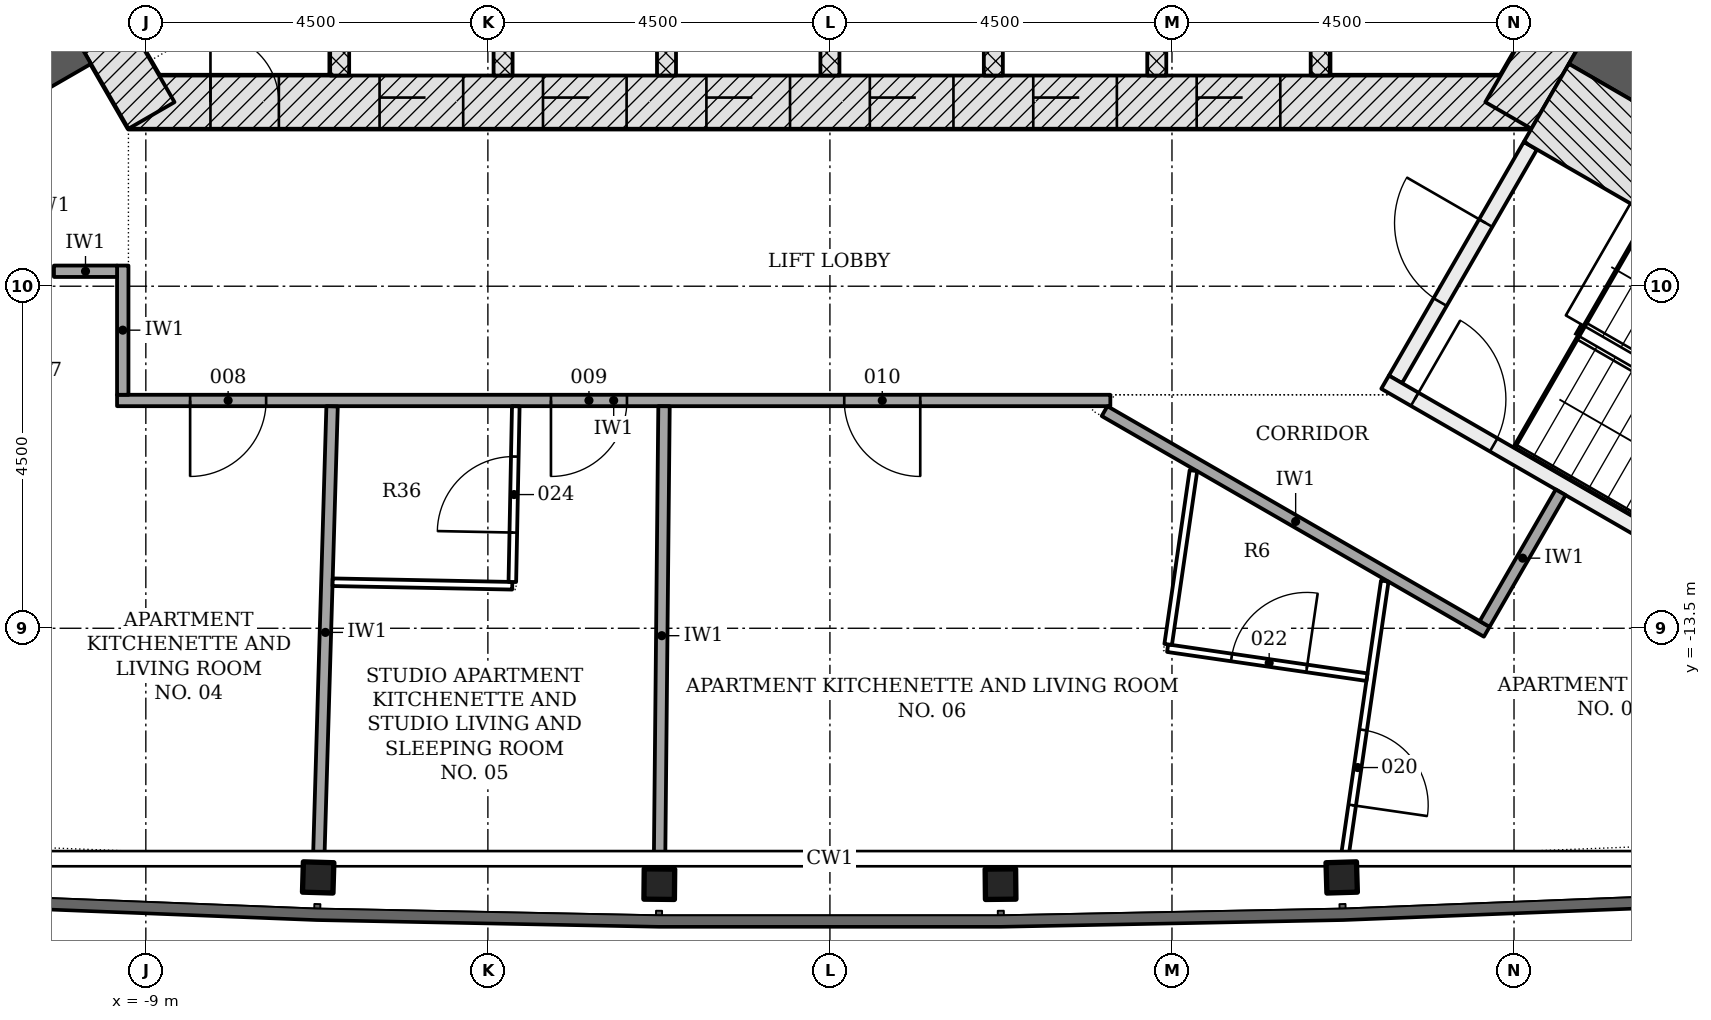
"""IFC4 building model, lengths in metres.
Left out: names, types, materials, properties, quantities, classifications, styles, units other than length and angle.
Written with IfcOpenShell. Run it as: python <this file> out.ifc"""

import sys

from ifc_helpers import new_model, si_unit, direction, frame, frame_2d, origin, origin_2d, place, context, subcontext, project, spatial, rectangle, i_section, extrude, element, fill, save


model = new_model("IFC4")
c1 = context("Model", 3, precision=1e-05, world=origin(), true_north=direction((0.0, 1.0)))
c2 = subcontext(c1, "Body", "Model", "MODEL_VIEW")
j1 = project(units=[si_unit("LENGTHUNIT", "METRE"), si_unit("PLANEANGLEUNIT", "RADIAN")], contexts=[c1])
p1 = place(None, origin())
s1 = spatial("IfcSite", under=j1, at=p1, CompositionType="ELEMENT")
p2 = place(p1, origin())
s2 = spatial("IfcBuilding", under=s1, at=p2, CompositionType="ELEMENT")
p3 = place(p2, frame((0.0, 0.0, 91.5)))
s3 = spatial("IfcBuildingStorey", under=s2, at=p3, CompositionType="ELEMENT", Elevation=91.5)
p4 = place(p3, frame((-9.229, -6.578, -0.2), z_axis=(0.0, 0.0, 1.0), x_axis=(1.0, 0.0, 0.0)))
e1 = element("IfcWall", 1, at=p4, inside=s3, PredefinedType="SHEAR", context=c2, shape_type="SweptSolid", body=[
    extrude(rectangle(XDim=18.458, YDim=0.7, at=frame_2d((9.229, 0.0))), origin(), (0.0, 0.0, 1.0), 3.6),
])
p5 = place(p4, frame((3.304, 0.0, 0.2)))
e2 = element("IfcOpeningElement", 2, at=p5, cuts=e1, PredefinedType="OPENING", context=c2, shape_type="SweptSolid", body=[
    extrude(rectangle(XDim=1.1, YDim=2.1, at=frame_2d((0.55, 1.05))), frame((0.0, 0.36, 0.0), z_axis=(0.0, -1.0, 0.0), x_axis=(1.0, 0.0, 0.0)), (0.0, 0.0, 1.0), 0.72),
])
p6 = place(p4, frame((5.454, 0.0, 0.2)))
e3 = element("IfcOpeningElement", 3, at=p6, cuts=e1, PredefinedType="OPENING", context=c2, shape_type="SweptSolid", body=[
    extrude(rectangle(XDim=1.1, YDim=2.1, at=frame_2d((0.55, 1.05))), frame((0.0, 0.36, 0.0), z_axis=(0.0, -1.0, 0.0), x_axis=(1.0, 0.0, 0.0)), (0.0, 0.0, 1.0), 0.72),
])
p7 = place(p4, frame((7.604, 0.0, 0.2)))
e4 = element("IfcOpeningElement", 4, at=p7, cuts=e1, PredefinedType="OPENING", context=c2, shape_type="SweptSolid", body=[
    extrude(rectangle(XDim=1.1, YDim=2.1, at=frame_2d((0.55, 1.05))), frame((0.0, 0.36, 0.0), z_axis=(0.0, -1.0, 0.0), x_axis=(1.0, 0.0, 0.0)), (0.0, 0.0, 1.0), 0.72),
])
p8 = place(p4, frame((9.754, 0.0, 0.2)))
e5 = element("IfcOpeningElement", 5, at=p8, cuts=e1, PredefinedType="OPENING", context=c2, shape_type="SweptSolid", body=[
    extrude(rectangle(XDim=1.1, YDim=2.1, at=frame_2d((0.55, 1.05))), frame((0.0, 0.36, 0.0), z_axis=(0.0, -1.0, 0.0), x_axis=(1.0, 0.0, 0.0)), (0.0, 0.0, 1.0), 0.72),
])
p9 = place(p4, frame((11.904, 0.0, 0.2)))
e6 = element("IfcOpeningElement", 6, at=p9, cuts=e1, PredefinedType="OPENING", context=c2, shape_type="SweptSolid", body=[
    extrude(rectangle(XDim=1.1, YDim=2.1, at=frame_2d((0.55, 1.05))), frame((0.0, 0.36, 0.0), z_axis=(0.0, -1.0, 0.0), x_axis=(1.0, 0.0, 0.0)), (0.0, 0.0, 1.0), 0.72),
])
p10 = place(p4, frame((14.054, 0.0, 0.2)))
e7 = element("IfcOpeningElement", 7, at=p10, cuts=e1, PredefinedType="OPENING", context=c2, shape_type="SweptSolid", body=[
    extrude(rectangle(XDim=1.1, YDim=2.1, at=frame_2d((0.55, 1.05))), frame((0.0, 0.36, 0.0), z_axis=(0.0, -1.0, 0.0), x_axis=(1.0, 0.0, 0.0)), (0.0, 0.0, 1.0), 0.72),
])
p11 = place(p4, frame((1.079, 0.0, 0.2)))
e8 = element("IfcOpeningElement", 8, at=p11, cuts=e1, PredefinedType="OPENING", context=c2, shape_type="SweptSolid", body=[
    extrude(rectangle(XDim=0.9, YDim=2.1, at=frame_2d((0.45, 1.05))), frame((0.0, 0.36, 0.0), z_axis=(0.0, -1.0, 0.0), x_axis=(1.0, 0.0, 0.0)), (0.0, 0.0, 1.0), 0.72),
])
for number, where, z_axis, x_axis in (
    (9, (8.926, -6.753, -0.2), (0.0, 0.0, 1.0), (0.5, 0.866, 0.0)),
    (10, (-10.311, -4.353, -0.2), (0.0, 0.0, 1.0), (0.5, -0.866, 0.0)),
):
    element("IfcWall", number, at=place(p3, frame(where, z_axis=z_axis, x_axis=x_axis)), inside=s3, PredefinedType="SHEAR", context=c2, shape_type="SweptSolid", body=[
        extrude(rectangle(XDim=2.771, YDim=0.7, at=frame_2d((1.386, 0.0))), origin(), (0.0, 0.0, 1.0), 3.6),
    ])
for number, where, z_axis, x_axis in (
    (11, (-9.922, -5.728, -0.2), (0.0, 0.0, 1.0), (-0.866, -0.5, 0.0)),
    (12, (9.922, -5.728, -0.2), (0.0, 0.0, 1.0), (0.866, -0.5, 0.0)),
):
    element("IfcWall", number, at=place(p3, frame(where, z_axis=z_axis, x_axis=x_axis)), inside=s3, PredefinedType="SHEAR", context=c2, shape_type="SweptSolid", body=[
        extrude(rectangle(XDim=12.677, YDim=0.8, at=frame_2d((6.339, 0.0))), origin(), (0.0, 0.0, 1.0), 3.6),
    ])
for number, where, z_axis, x_axis in (
    (13, (-6.733, -16.778, -0.2), (0.0, 0.0, 1.0), (1.0, -0.03, 0.0)),
    (14, (-2.245, -16.866, -0.2), (0.0, 0.0, 1.0), (1.0, -0.01, 0.0)),
    (15, (2.245, -16.866, -0.2), (0.0, 0.0, 1.0), (1.0, 0.01, 0.0)),
    (16, (6.733, -16.778, -0.2), (0.0, 0.0, 1.0), (1.0, 0.03, 0.0)),
):
    element("IfcColumn", number, at=place(p3, frame(where, z_axis=z_axis, x_axis=x_axis)), inside=s3, PredefinedType="COLUMN", context=c2, shape_type="SweptSolid", body=[
        extrude(i_section(OverallWidth=0.401, OverallDepth=0.399, WebThickness=0.025, FlangeThickness=0.04, FilletRadius=0.015, at=origin_2d()), origin(), (0.0, 0.0, 1.0), 3.6),
    ])
for number, where, z_axis, x_axis in (
    (17, (-6.45, -6.228, -0.2), (0.0, 0.0, 1.0), (0.0, 1.0, 0.0)),
    (18, (-4.3, -6.228, -0.2), (0.0, 0.0, 1.0), (0.0, 1.0, 0.0)),
    (19, (-2.15, -6.228, -0.2), (0.0, 0.0, 1.0), (0.0, 1.0, 0.0)),
    (20, (0.0, -6.228, -0.2), (0.0, 0.0, 1.0), (0.0, 1.0, 0.0)),
    (21, (2.15, -6.228, -0.2), (0.0, 0.0, 1.0), (0.0, 1.0, 0.0)),
    (22, (4.3, -6.228, -0.2), (0.0, 0.0, 1.0), (0.0, 1.0, 0.0)),
    (23, (6.45, -6.228, -0.2), (0.0, 0.0, 1.0), (0.0, 1.0, 0.0)),
):
    element("IfcWall", number, at=place(p3, frame(where, z_axis=z_axis, x_axis=x_axis)), inside=s3, PredefinedType="PARTITIONING", context=c2, shape_type="SweptSolid", body=[
        extrude(rectangle(XDim=2.5, YDim=0.25, at=frame_2d((1.25, 0.0))), origin(), (0.0, 0.0, 1.0), 3.6),
    ])
p12 = place(p3, frame((-10.418, -4.868, -0.2), z_axis=(0.0, 0.0, 1.0), x_axis=(-0.866018442252, -0.500012057535, 0.0)))
e24 = element("IfcWall", 24, at=p12, inside=s3, PredefinedType="SHEAR", context=c2, shape_type="SweptSolid", body=[
    extrude(rectangle(XDim=7.2, YDim=1.186, at=frame_2d((3.6, 0.0))), origin(), (0.0, 0.0, 1.0), 3.6),
])
p13 = place(p3, frame((7.44, -10.226, -0.2), z_axis=(0.0, 0.0, 1.0), x_axis=(0.500022077904, 0.866012656725, 0.0)))
e25 = element("IfcWall", 25, at=p13, inside=s3, PredefinedType="SHEAR", context=c2, shape_type="SweptSolid", body=[
    extrude(rectangle(XDim=3.55, YDim=0.2, at=frame_2d((1.775, 0.0))), origin(), (0.0, 0.0, 1.0), 3.6),
])
p14 = place(p13, frame((1.175, 0.0, 0.2)))
e26 = element("IfcOpeningElement", 26, at=p14, cuts=e25, PredefinedType="OPENING", context=c2, shape_type="SweptSolid", body=[
    extrude(rectangle(XDim=1.2, YDim=2.1, at=frame_2d((0.6, 1.05))), frame((0.0, 0.11, 0.0), z_axis=(0.0, -1.0, 0.0), x_axis=(1.0, 0.0, 0.0)), (0.0, 0.0, 1.0), 0.22),
])
p15 = place(p3, frame((7.304, -10.262, -0.2), z_axis=(0.0, 0.0, 1.0), x_axis=(0.866026594901, -0.49999793692, 0.0)))
e27 = element("IfcWall", 27, at=p15, inside=s3, PredefinedType="SHEAR", context=c2, shape_type="SweptSolid", body=[
    extrude(rectangle(XDim=5.6, YDim=0.2, at=frame_2d((2.8, 0.0))), origin(), (0.0, 0.0, 1.0), 3.6),
])
p16 = place(p15, frame((0.45, 0.0, 0.2)))
e28 = element("IfcOpeningElement", 28, at=p16, cuts=e27, PredefinedType="OPENING", context=c2, shape_type="SweptSolid", body=[
    extrude(rectangle(XDim=1.2, YDim=2.1, at=frame_2d((0.6, 1.05))), frame((0.0, 0.11, 0.0), z_axis=(0.0, -1.0, 0.0), x_axis=(1.0, 0.0, 0.0)), (0.0, 0.0, 1.0), 0.22),
])
p17 = place(p3, frame((9.425, -6.588, -0.2), z_axis=(0.0, 0.0, 1.0), x_axis=(0.866018442252, -0.500012057535, 0.0)))
e29 = element("IfcWall", 29, at=p17, inside=s3, PredefinedType="SHEAR", context=c2, shape_type="SweptSolid", body=[
    extrude(rectangle(XDim=7.2, YDim=1.186, at=frame_2d((3.6, 0.0))), origin(), (0.0, 0.0, 1.0), 3.6),
])
p18 = place(p3, frame((3.689, -10.503, 0.0), z_axis=(0.0, 0.0, 1.0), x_axis=(-1.0, 0.0, 0.0)))
e30 = element("IfcWall", 30, at=p18, inside=s3, PredefinedType="PARTITIONING", context=c2, shape_type="SweptSolid", body=[
    extrude(rectangle(XDim=13.068, YDim=0.15, at=frame_2d((6.534, 0.0))), origin(), (0.0, 0.0, 1.0), 2.778),
])
p19 = place(p18, frame((11.106, 0.0, 0.0)))
e31 = element("IfcOpeningElement", 31, at=p19, cuts=e30, PredefinedType="OPENING", context=c2, shape_type="SweptSolid", body=[
    extrude(rectangle(XDim=1.0, YDim=2.1, at=frame_2d((0.5, 1.05))), frame((0.0, 0.085, 0.0), z_axis=(0.0, -1.0, 0.0), x_axis=(1.0, 0.0, 0.0)), (0.0, 0.0, 1.0), 0.17),
])
p20 = place(p18, frame((6.359, 0.0, 0.0)))
e32 = element("IfcOpeningElement", 32, at=p20, cuts=e30, PredefinedType="OPENING", context=c2, shape_type="SweptSolid", body=[
    extrude(rectangle(XDim=1.0, YDim=2.1, at=frame_2d((0.5, 1.05))), frame((0.0, 0.085, 0.0), z_axis=(0.0, -1.0, 0.0), x_axis=(1.0, 0.0, 0.0)), (0.0, 0.0, 1.0), 0.17),
])
p21 = place(p18, frame((2.501, 0.0, 0.0)))
e33 = element("IfcOpeningElement", 33, at=p21, cuts=e30, PredefinedType="OPENING", context=c2, shape_type="SweptSolid", body=[
    extrude(rectangle(XDim=1.0, YDim=2.1, at=frame_2d((0.5, 1.05))), frame((0.0, 0.085, 0.0), z_axis=(0.0, -1.0, 0.0), x_axis=(1.0, 0.0, 0.0)), (0.0, 0.0, 1.0), 0.17),
])
p22 = place(p3, frame((3.613, -10.643, 0.0), z_axis=(0.0, 0.0, 1.0), x_axis=(0.866042728627, -0.499969991291, 0.0)))
e34 = element("IfcWall", 34, at=p22, inside=s3, PredefinedType="PARTITIONING", context=c2, shape_type="SweptSolid", body=[
    extrude(rectangle(XDim=5.805, YDim=0.15, at=frame_2d((2.903, 0.0))), origin(), (0.0, 0.0, 1.0), 2.778),
])
p23 = place(p3, frame((8.614, -13.444, 0.0), z_axis=(0.0, 0.0, 1.0), x_axis=(0.499972520799, 0.866041268327, 0.0)))
e35 = element("IfcWall", 35, at=p23, inside=s3, PredefinedType="PARTITIONING", context=c2, shape_type="SweptSolid", body=[
    extrude(rectangle(XDim=2.0, YDim=0.15, at=frame_2d((1.0, 0.0))), origin(), (0.0, 0.0, 1.0), 3.4),
])
p24 = place(p3, frame((-11.345, -7.012, 0.0), z_axis=(0.0, 0.0, 1.0), x_axis=(0.499998569178, -0.866026229868, 0.0)))
e36 = element("IfcWall", 36, at=p24, inside=s3, PredefinedType="PARTITIONING", context=c2, shape_type="SweptSolid", body=[
    extrude(rectangle(XDim=2.143, YDim=0.15, at=frame_2d((1.072, 0.0))), origin(), (0.0, 0.0, 1.0), 2.778),
])
p25 = place(p3, frame((-9.304, -10.428, 0.0), z_axis=(0.0, 0.0, 1.0), x_axis=(0.0, 1.0, 0.0)))
e37 = element("IfcWall", 37, at=p25, inside=s3, PredefinedType="PARTITIONING", context=c2, shape_type="SweptSolid", body=[
    extrude(rectangle(XDim=1.7, YDim=0.15, at=frame_2d((0.85, 0.0))), origin(), (0.0, 0.0, 1.0), 3.4),
])
p26 = place(p3, frame((-10.209, -8.803, 0.0), z_axis=(0.0, 0.0, 1.0), x_axis=(1.0, 0.0, 0.0)))
e38 = element("IfcWall", 38, at=p26, inside=s3, PredefinedType="PARTITIONING", context=c2, shape_type="SweptSolid", body=[
    extrude(rectangle(XDim=0.83, YDim=0.15, at=frame_2d((0.415, 0.0))), origin(), (0.0, 0.0, 1.0), 3.4),
])
p27 = place(p3, frame((-2.242, -16.616, 0.0), z_axis=(0.0, 0.0, 1.0), x_axis=(0.009866078621, 0.999951329062, 0.0)))
e39 = element("IfcWall", 39, at=p27, inside=s3, PredefinedType="PARTITIONING", context=c2, shape_type="SweptSolid", body=[
    extrude(rectangle(XDim=6.038, YDim=0.15, at=frame_2d((3.019, 0.0))), origin(), (0.0, 0.0, 1.0), 2.778),
])
p28 = place(p3, frame((-6.725, -16.528, 0.0), z_axis=(0.0, 0.0, 1.0), x_axis=(0.029499121441, 0.99956480622, 0.0)))
e40 = element("IfcWall", 40, at=p28, inside=s3, PredefinedType="PARTITIONING", context=c2, shape_type="SweptSolid", body=[
    extrude(rectangle(XDim=5.951, YDim=0.15, at=frame_2d((2.975, 0.0))), origin(), (0.0, 0.0, 1.0), 2.778),
])
p29 = place(p3, frame((7.3, -12.879, 0.0), z_axis=(0.0, 0.0, 1.0), x_axis=(-0.14388794615, -0.989593986922, 0.0)))
e41 = element("IfcWall", 41, at=p29, inside=s3, PredefinedType="PARTITIONING", context=c2, shape_type="SweptSolid", body=[
    extrude(rectangle(XDim=3.685, YDim=0.1, at=frame_2d((1.843, 0.0))), origin(), (0.0, 0.0, 1.0), 2.778),
])
p30 = place(p29, frame((1.979, 0.0, 0.0)))
e42 = element("IfcOpeningElement", 42, at=p30, cuts=e41, PredefinedType="OPENING", context=c2, shape_type="SweptSolid", body=[
    extrude(rectangle(XDim=1.0, YDim=2.1, at=frame_2d((0.5, 1.05))), frame((0.0, 0.06, 0.0), z_axis=(0.0, -1.0, 0.0), x_axis=(1.0, 0.0, 0.0)), (0.0, 0.0, 1.0), 0.12),
])
p31 = place(p3, frame((4.443, -13.762, 0.0), z_axis=(0.0, 0.0, 1.0), x_axis=(0.989603850573, -0.143820092239, 0.0)))
e43 = element("IfcWall", 43, at=p31, inside=s3, PredefinedType="PARTITIONING", context=c2, shape_type="SweptSolid", body=[
    extrude(rectangle(XDim=2.65, YDim=0.1, at=frame_2d((1.325, 0.0))), origin(), (0.0, 0.0, 1.0), 2.778),
])
p32 = place(p31, frame((0.85, 0.0, 0.0)))
e44 = element("IfcOpeningElement", 44, at=p32, cuts=e43, PredefinedType="OPENING", context=c2, shape_type="SweptSolid", body=[
    extrude(rectangle(XDim=1.0, YDim=2.1, at=frame_2d((0.5, 1.05))), frame((0.0, 0.06, 0.0), z_axis=(0.0, -1.0, 0.0), x_axis=(1.0, 0.0, 0.0)), (0.0, 0.0, 1.0), 0.12),
])
p33 = place(p3, frame((4.782, -11.426, 0.0), z_axis=(0.0, 0.0, 1.0), x_axis=(-0.14392103122, -0.989589175756, 0.0)))
e45 = element("IfcWall", 45, at=p33, inside=s3, PredefinedType="PARTITIONING", context=c2, shape_type="SweptSolid", body=[
    extrude(rectangle(XDim=2.311, YDim=0.1, at=frame_2d((1.155, 0.0))), origin(), (0.0, 0.0, 1.0), 3.4),
])
p34 = place(p3, frame((-6.542, -12.894, 0.0), z_axis=(0.0, 0.0, 1.0), x_axis=(0.999805392652, -0.019727565082, 0.0)))
e46 = element("IfcWall", 46, at=p34, inside=s3, PredefinedType="PARTITIONING", context=c2, shape_type="SweptSolid", body=[
    extrude(rectangle(XDim=2.364, YDim=0.1, at=frame_2d((1.182, 0.0))), origin(), (0.0, 0.0, 1.0), 2.778),
])
p35 = place(p3, frame((-4.178, -12.891, 0.0), z_axis=(0.0, 0.0, 1.0), x_axis=(0.019639257197, 0.999807131189, 0.0)))
e47 = element("IfcWall", 47, at=p35, inside=s3, PredefinedType="PARTITIONING", context=c2, shape_type="SweptSolid", body=[
    extrude(rectangle(XDim=2.312, YDim=0.1, at=frame_2d((1.156, 0.0))), origin(), (0.0, 0.0, 1.0), 3.4),
])
p36 = place(p35, frame((0.65, 0.0, 0.0)))
e48 = element("IfcOpeningElement", 48, at=p36, cuts=e47, PredefinedType="OPENING", context=c2, shape_type="SweptSolid", body=[
    extrude(rectangle(XDim=1.0, YDim=2.1, at=frame_2d((0.5, 1.05))), frame((0.0, 0.06, 0.0), z_axis=(0.0, -1.0, 0.0), x_axis=(1.0, 0.0, 0.0)), (0.0, 0.0, 1.0), 0.12),
])
p37 = place(p5, origin())
e49 = element("IfcDoor", 49, at=p37, inside=s3, OperationType="DOUBLE_DOOR_SLIDING", PredefinedType="DOOR", context=c2, shape_type="SweptSolid", body=[
    extrude(rectangle(XDim=1.1, YDim=2.1, at=frame_2d((0.55, 1.05))), frame((0.0, 0.025, 0.0), z_axis=(0.0, -1.0, 0.0), x_axis=(1.0, 0.0, 0.0)), (0.0, 0.0, 1.0), 0.05),
])
fill(e2, e49)
p38 = place(p6, origin())
e50 = element("IfcDoor", 50, at=p38, inside=s3, OperationType="DOUBLE_DOOR_SLIDING", PredefinedType="DOOR", context=c2, shape_type="SweptSolid", body=[
    extrude(rectangle(XDim=1.1, YDim=2.1, at=frame_2d((0.55, 1.05))), frame((0.0, 0.025, 0.0), z_axis=(0.0, -1.0, 0.0), x_axis=(1.0, 0.0, 0.0)), (0.0, 0.0, 1.0), 0.05),
])
fill(e3, e50)
p39 = place(p7, origin())
e51 = element("IfcDoor", 51, at=p39, inside=s3, OperationType="DOUBLE_DOOR_SLIDING", PredefinedType="DOOR", context=c2, shape_type="SweptSolid", body=[
    extrude(rectangle(XDim=1.1, YDim=2.1, at=frame_2d((0.55, 1.05))), frame((0.0, 0.025, 0.0), z_axis=(0.0, -1.0, 0.0), x_axis=(1.0, 0.0, 0.0)), (0.0, 0.0, 1.0), 0.05),
])
fill(e4, e51)
p40 = place(p8, origin())
e52 = element("IfcDoor", 52, at=p40, inside=s3, OperationType="DOUBLE_DOOR_SLIDING", PredefinedType="DOOR", context=c2, shape_type="SweptSolid", body=[
    extrude(rectangle(XDim=1.1, YDim=2.1, at=frame_2d((0.55, 1.05))), frame((0.0, 0.025, 0.0), z_axis=(0.0, -1.0, 0.0), x_axis=(1.0, 0.0, 0.0)), (0.0, 0.0, 1.0), 0.05),
])
fill(e5, e52)
p41 = place(p9, origin())
e53 = element("IfcDoor", 53, at=p41, inside=s3, OperationType="DOUBLE_DOOR_SLIDING", PredefinedType="DOOR", context=c2, shape_type="SweptSolid", body=[
    extrude(rectangle(XDim=1.1, YDim=2.1, at=frame_2d((0.55, 1.05))), frame((0.0, 0.025, 0.0), z_axis=(0.0, -1.0, 0.0), x_axis=(1.0, 0.0, 0.0)), (0.0, 0.0, 1.0), 0.05),
])
fill(e6, e53)
p42 = place(p10, origin())
e54 = element("IfcDoor", 54, at=p42, inside=s3, OperationType="DOUBLE_DOOR_SLIDING", PredefinedType="DOOR", context=c2, shape_type="SweptSolid", body=[
    extrude(rectangle(XDim=1.1, YDim=2.1, at=frame_2d((0.55, 1.05))), frame((0.0, 0.025, 0.0), z_axis=(0.0, -1.0, 0.0), x_axis=(1.0, 0.0, 0.0)), (0.0, 0.0, 1.0), 0.05),
])
fill(e7, e54)
p43 = place(p11, origin())
e55 = element("IfcDoor", 55, at=p43, inside=s3, OperationType="SINGLE_SWING_LEFT", PredefinedType="DOOR", context=c2, shape_type="SweptSolid", body=[
    extrude(rectangle(XDim=0.9, YDim=2.1, at=frame_2d((0.45, 1.05))), frame((0.0, 0.075, 0.0), z_axis=(0.0, -1.0, 0.0), x_axis=(1.0, 0.0, 0.0)), (0.0, 0.0, 1.0), 0.15),
])
fill(e8, e55)
p44 = place(p14, origin())
e56 = element("IfcDoor", 56, at=p44, inside=s3, OperationType="SINGLE_SWING_RIGHT", PredefinedType="DOOR", context=c2, shape_type="SweptSolid", body=[
    extrude(rectangle(XDim=1.2, YDim=2.1, at=frame_2d((0.6, 1.05))), frame((0.0, 0.025, 0.0), z_axis=(0.0, -1.0, 0.0), x_axis=(1.0, 0.0, 0.0)), (0.0, 0.0, 1.0), 0.05),
])
fill(e26, e56)
p45 = place(p16, origin())
e57 = element("IfcDoor", 57, at=p45, inside=s3, OperationType="SINGLE_SWING_LEFT", PredefinedType="DOOR", context=c2, shape_type="SweptSolid", body=[
    extrude(rectangle(XDim=1.2, YDim=2.1, at=frame_2d((0.6, 1.05))), frame((0.0, 0.025, 0.0), z_axis=(0.0, -1.0, 0.0), x_axis=(1.0, 0.0, 0.0)), (0.0, 0.0, 1.0), 0.05),
])
fill(e28, e57)
p46 = place(p19, origin())
e58 = element("IfcDoor", 58, at=p46, inside=s3, OperationType="SINGLE_SWING_RIGHT", PredefinedType="DOOR", context=c2, shape_type="SweptSolid", body=[
    extrude(rectangle(XDim=1.0, YDim=2.1, at=frame_2d((0.5, 1.05))), frame((0.0, 0.025, 0.0), z_axis=(0.0, -1.0, 0.0), x_axis=(1.0, 0.0, 0.0)), (0.0, 0.0, 1.0), 0.05),
])
fill(e31, e58)
p47 = place(p20, origin())
e59 = element("IfcDoor", 59, at=p47, inside=s3, OperationType="SINGLE_SWING_RIGHT", PredefinedType="DOOR", context=c2, shape_type="SweptSolid", body=[
    extrude(rectangle(XDim=1.0, YDim=2.1, at=frame_2d((0.5, 1.05))), frame((0.0, 0.025, 0.0), z_axis=(0.0, -1.0, 0.0), x_axis=(1.0, 0.0, 0.0)), (0.0, 0.0, 1.0), 0.05),
])
fill(e32, e59)
p48 = place(p21, origin())
e60 = element("IfcDoor", 60, at=p48, inside=s3, OperationType="SINGLE_SWING_LEFT", PredefinedType="DOOR", context=c2, shape_type="SweptSolid", body=[
    extrude(rectangle(XDim=1.0, YDim=2.1, at=frame_2d((0.5, 1.05))), frame((0.0, 0.025, 0.0), z_axis=(0.0, -1.0, 0.0), x_axis=(1.0, 0.0, 0.0)), (0.0, 0.0, 1.0), 0.05),
])
fill(e33, e60)
p49 = place(p30, origin())
e61 = element("IfcDoor", 61, at=p49, inside=s3, OperationType="SINGLE_SWING_RIGHT", PredefinedType="DOOR", context=c2, shape_type="SweptSolid", body=[
    extrude(rectangle(XDim=1.0, YDim=2.1, at=frame_2d((0.5, 1.05))), frame((0.0, 0.025, 0.0), z_axis=(0.0, -1.0, 0.0), x_axis=(1.0, 0.0, 0.0)), (0.0, 0.0, 1.0), 0.05),
])
fill(e42, e61)
p50 = place(p32, origin())
e62 = element("IfcDoor", 62, at=p50, inside=s3, OperationType="SINGLE_SWING_RIGHT", PredefinedType="DOOR", context=c2, shape_type="SweptSolid", body=[
    extrude(rectangle(XDim=1.0, YDim=2.1, at=frame_2d((0.5, 1.05))), frame((0.0, 0.025, 0.0), z_axis=(0.0, -1.0, 0.0), x_axis=(1.0, 0.0, 0.0)), (0.0, 0.0, 1.0), 0.05),
])
fill(e44, e62)
p51 = place(p36, origin())
e63 = element("IfcDoor", 63, at=p51, inside=s3, OperationType="SINGLE_SWING_LEFT", PredefinedType="DOOR", context=c2, shape_type="SweptSolid", body=[
    extrude(rectangle(XDim=1.0, YDim=2.1, at=frame_2d((0.5, 1.05))), frame((0.0, 0.025, 0.0), z_axis=(0.0, -1.0, 0.0), x_axis=(1.0, 0.0, 0.0)), (0.0, 0.0, 1.0), 0.05),
])
fill(e48, e63)
save(model, sys.argv[1])
